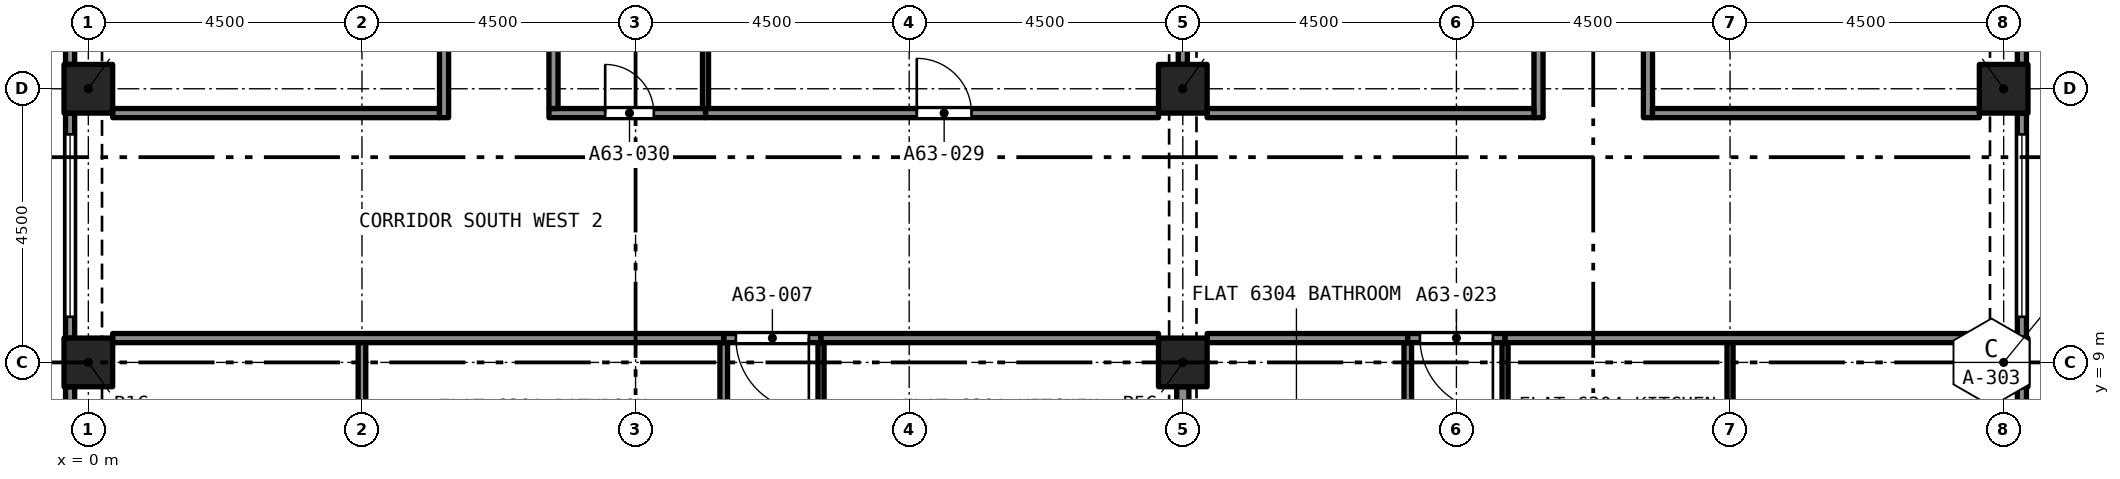
"""IFC4 building model, lengths in metres.
Left out: names, types, materials, properties, quantities, classifications, styles, units other than length and angle.
Written with IfcOpenShell. Run it as: python <this file> out.ifc"""

import sys

from ifc_helpers import new_model, si_unit, direction, frame, frame_2d, origin, origin_2d, place, context, subcontext, project, spatial, rectangle, extrude, element, fill, save


model = new_model("IFC4")
c1 = context("Model", 3, precision=1e-05, world=origin(), true_north=direction((0.0, 1.0)))
c2 = subcontext(c1, "Body", "Model", "MODEL_VIEW")
j1 = project(units=[si_unit("LENGTHUNIT", "METRE"), si_unit("PLANEANGLEUNIT", "RADIAN")], contexts=[c1])
p1 = place(None, origin())
s1 = spatial("IfcSite", under=j1, at=p1, CompositionType="ELEMENT")
p2 = place(p1, origin())
s2 = spatial("IfcBuilding", under=s1, at=p2, CompositionType="ELEMENT")
p3 = place(p2, frame((0.0, 0.0, 226.095)))
s3 = spatial("IfcBuildingStorey", under=s2, at=p3, CompositionType="ELEMENT", Elevation=226.095)
for number, where, z_axis, x_axis in (
    (1, (0.0, 9.0, 0.0), (0.0, 0.0, 1.0), (1.0, 0.0, 0.0)),
    (2, (18.0, 9.0, 0.0), (0.0, 0.0, 1.0), (1.0, 0.0, 0.0)),
    (3, (31.5, 9.0, 0.0), (0.0, 0.0, 1.0), (1.0, 0.0, 0.0)),
    (4, (0.0, 13.5, 0.0), (0.0, 0.0, 1.0), (1.0, 0.0, 0.0)),
    (5, (18.0, 13.5, 0.0), (0.0, 0.0, 1.0), (1.0, 0.0, 0.0)),
    (6, (31.5, 13.5, 0.0), (0.0, 0.0, 1.0), (1.0, 0.0, 0.0)),
):
    element("IfcColumn", number, at=place(p3, frame(where, z_axis=z_axis, x_axis=x_axis)), inside=s3, PredefinedType="COLUMN", context=c2, shape_type="SweptSolid", body=[
        extrude(rectangle(XDim=0.8, YDim=0.8, at=origin_2d()), origin(), (0.0, 0.0, 1.0), 3.2),
    ])
p4 = place(p3, frame((31.8, 8.6, 0.0), z_axis=(0.0, 0.0, 1.0), x_axis=(0.0, -1.0, 0.0)))
e7 = element("IfcWall", 7, at=p4, inside=s3, PredefinedType="SOLIDWALL", context=c2, shape_type="SweptSolid", body=[
    extrude(rectangle(XDim=3.7, YDim=0.15, at=frame_2d((1.85, 0.0))), origin(), (0.0, 0.0, 1.0), 3.2),
])
p5 = place(p4, frame((0.35, 0.0, 0.45)))
e8 = element("IfcOpeningElement", 8, at=p5, cuts=e7, PredefinedType="OPENING", context=c2, shape_type="SweptSolid", body=[
    extrude(rectangle(XDim=3.0, YDim=1.95, at=frame_2d((1.5, 0.975))), frame((0.0, 0.085, 0.0), z_axis=(0.0, -1.0, 0.0), x_axis=(1.0, 0.0, 0.0)), (0.0, 0.0, 1.0), 0.17),
])
p6 = place(p3, frame((31.8, 13.1, 0.0), z_axis=(0.0, 0.0, 1.0), x_axis=(0.0, -1.0, 0.0)))
e9 = element("IfcWall", 9, at=p6, inside=s3, PredefinedType="SOLIDWALL", context=c2, shape_type="SweptSolid", body=[
    extrude(rectangle(XDim=3.7, YDim=0.15, at=frame_2d((1.85, 0.0))), origin(), (0.0, 0.0, 1.0), 3.2),
])
p7 = place(p6, frame((0.35, 0.0, 0.45)))
e10 = element("IfcOpeningElement", 10, at=p7, cuts=e9, PredefinedType="OPENING", context=c2, shape_type="SweptSolid", body=[
    extrude(rectangle(XDim=3.0, YDim=1.95, at=frame_2d((1.5, 0.975))), frame((0.0, 0.085, 0.0), z_axis=(0.0, -1.0, 0.0), x_axis=(1.0, 0.0, 0.0)), (0.0, 0.0, 1.0), 0.17),
])
p8 = place(p3, frame((31.8, 17.6, 0.0), z_axis=(0.0, 0.0, 1.0), x_axis=(0.0, -1.0, 0.0)))
e11 = element("IfcWall", 11, at=p8, inside=s3, PredefinedType="SOLIDWALL", context=c2, shape_type="SweptSolid", body=[
    extrude(rectangle(XDim=3.7, YDim=0.15, at=frame_2d((1.85, 0.0))), origin(), (0.0, 0.0, 1.0), 3.2),
])
p9 = place(p8, frame((0.35, 0.0, 0.45)))
e12 = element("IfcOpeningElement", 12, at=p9, cuts=e11, PredefinedType="OPENING", context=c2, shape_type="SweptSolid", body=[
    extrude(rectangle(XDim=3.0, YDim=1.95, at=frame_2d((1.5, 0.975))), frame((0.0, 0.085, 0.0), z_axis=(0.0, -1.0, 0.0), x_axis=(1.0, 0.0, 0.0)), (0.0, 0.0, 1.0), 0.17),
])
p10 = place(p3, frame((-0.3, 13.9, 0.0), z_axis=(0.0, 0.0, 1.0), x_axis=(0.0, 1.0, 0.0)))
e13 = element("IfcWall", 13, at=p10, inside=s3, PredefinedType="SOLIDWALL", context=c2, shape_type="SweptSolid", body=[
    extrude(rectangle(XDim=3.7, YDim=0.15, at=frame_2d((1.85, 0.0))), origin(), (0.0, 0.0, 1.0), 3.2),
])
p11 = place(p10, frame((0.35, 0.0, 0.45)))
e14 = element("IfcOpeningElement", 14, at=p11, cuts=e13, PredefinedType="OPENING", context=c2, shape_type="SweptSolid", body=[
    extrude(rectangle(XDim=3.0, YDim=1.95, at=frame_2d((1.5, 0.975))), frame((0.0, 0.085, 0.0), z_axis=(0.0, -1.0, 0.0), x_axis=(1.0, 0.0, 0.0)), (0.0, 0.0, 1.0), 0.17),
])
p12 = place(p3, frame((-0.3, 9.4, 0.0), z_axis=(0.0, 0.0, 1.0), x_axis=(0.0, 1.0, 0.0)))
e15 = element("IfcWall", 15, at=p12, inside=s3, PredefinedType="SOLIDWALL", context=c2, shape_type="SweptSolid", body=[
    extrude(rectangle(XDim=3.7, YDim=0.15, at=frame_2d((1.85, 0.0))), origin(), (0.0, 0.0, 1.0), 3.2),
])
p13 = place(p12, frame((0.35, 0.0, 0.45)))
e16 = element("IfcOpeningElement", 16, at=p13, cuts=e15, PredefinedType="OPENING", context=c2, shape_type="SweptSolid", body=[
    extrude(rectangle(XDim=3.0, YDim=1.95, at=frame_2d((1.5, 0.975))), frame((0.0, 0.085, 0.0), z_axis=(0.0, -1.0, 0.0), x_axis=(1.0, 0.0, 0.0)), (0.0, 0.0, 1.0), 0.17),
])
p14 = place(p3, frame((-0.3, 4.9, 0.0), z_axis=(0.0, 0.0, 1.0), x_axis=(0.0, 1.0, 0.0)))
e17 = element("IfcWall", 17, at=p14, inside=s3, PredefinedType="SOLIDWALL", context=c2, shape_type="SweptSolid", body=[
    extrude(rectangle(XDim=3.7, YDim=0.15, at=frame_2d((1.85, 0.0))), origin(), (0.0, 0.0, 1.0), 3.2),
])
p15 = place(p14, frame((0.35, 0.0, 0.45)))
e18 = element("IfcOpeningElement", 18, at=p15, cuts=e17, PredefinedType="OPENING", context=c2, shape_type="SweptSolid", body=[
    extrude(rectangle(XDim=3.0, YDim=1.95, at=frame_2d((1.5, 0.975))), frame((0.0, 0.085, 0.0), z_axis=(0.0, -1.0, 0.0), x_axis=(1.0, 0.0, 0.0)), (0.0, 0.0, 1.0), 0.17),
])
p16 = place(p3, frame((10.45, 7.173, 0.0), z_axis=(0.0, 0.0, 1.0), x_axis=(0.0, 1.0, 0.0)))
e19 = element("IfcWall", 19, at=p16, inside=s3, PredefinedType="PARTITIONING", context=c2, shape_type="SweptSolid", body=[
    extrude(rectangle(XDim=2.152, YDim=0.125, at=frame_2d((1.076, 0.0))), origin(), (0.0, 0.0, 1.0), 2.9),
])
p17 = place(p3, frame((4.5, 7.11, 0.0), z_axis=(0.0, 0.0, 1.0), x_axis=(0.0, 1.0, 0.0)))
e20 = element("IfcWall", 20, at=p17, inside=s3, PredefinedType="PARTITIONING", context=c2, shape_type="SweptSolid", body=[
    extrude(rectangle(XDim=2.215, YDim=0.125, at=frame_2d((1.107, 0.0))), origin(), (0.0, 0.0, 1.0), 2.9),
])
p18 = place(p3, frame((12.05, 7.16, 0.0), z_axis=(0.0, 0.0, 1.0), x_axis=(0.0, 1.0, 0.0)))
e21 = element("IfcWall", 21, at=p18, inside=s3, PredefinedType="PARTITIONING", context=c2, shape_type="SweptSolid", body=[
    extrude(rectangle(XDim=2.165, YDim=0.1, at=frame_2d((1.083, 0.0))), origin(), (0.0, 0.0, 1.0), 2.9),
])
p19 = place(p3, frame((12.05, 9.4, 0.0), z_axis=(0.0, 0.0, 1.0), x_axis=(-1.0, 0.0, 0.0)))
e22 = element("IfcWall", 22, at=p19, inside=s3, PredefinedType="PARTITIONING", context=c2, shape_type="SweptSolid", body=[
    extrude(rectangle(XDim=1.6, YDim=0.15, at=frame_2d((0.8, 0.0))), origin(), (0.0, 0.0, 1.0), 2.9),
])
p20 = place(p19, frame((0.2, 0.0, 0.0)))
e23 = element("IfcOpeningElement", 23, at=p20, cuts=e22, PredefinedType="OPENING", context=c2, shape_type="SweptSolid", body=[
    extrude(rectangle(XDim=1.2, YDim=2.4, at=frame_2d((0.6, 1.2))), frame((0.0, 0.085, 0.0), z_axis=(0.0, -1.0, 0.0), x_axis=(1.0, 0.0, 0.0)), (0.0, 0.0, 1.0), 0.17),
])
p21 = place(p3, frame((18.0, 7.127, 0.0), z_axis=(0.0, 0.0, 1.0), x_axis=(0.0, 1.0, 0.0)))
e24 = element("IfcWall", 24, at=p21, inside=s3, PredefinedType="PARTITIONING", context=c2, shape_type="SweptSolid", body=[
    extrude(rectangle(XDim=1.473, YDim=0.2, at=frame_2d((0.736, 0.0))), origin(), (0.0, 0.0, 1.0), 2.38),
])
p22 = place(p3, frame((12.05, 9.4, 0.0), z_axis=(0.0, 0.0, 1.0), x_axis=(1.0, 0.0, 0.0)))
e25 = element("IfcWall", 25, at=p22, inside=s3, PredefinedType="PARTITIONING", context=c2, shape_type="SweptSolid", body=[
    extrude(rectangle(XDim=5.55, YDim=0.15, at=frame_2d((2.775, 0.0))), origin(), (0.0, 0.0, 1.0), 2.9),
])
p23 = place(p3, frame((0.4, 9.4, 0.0), z_axis=(0.0, 0.0, 1.0), x_axis=(1.0, 0.0, 0.0)))
e26 = element("IfcWall", 26, at=p23, inside=s3, PredefinedType="PARTITIONING", context=c2, shape_type="SweptSolid", body=[
    extrude(rectangle(XDim=10.05, YDim=0.15, at=frame_2d((5.025, 0.0))), origin(), (0.0, 0.0, 1.0), 2.9),
])
p24 = place(p3, frame((21.7, 7.252, 0.0), z_axis=(0.0, 0.0, 1.0), x_axis=(0.0, 1.0, 0.0)))
e27 = element("IfcWall", 27, at=p24, inside=s3, PredefinedType="PARTITIONING", context=c2, shape_type="SweptSolid", body=[
    extrude(rectangle(XDim=2.073, YDim=0.125, at=frame_2d((1.036, 0.0))), origin(), (0.0, 0.0, 1.0), 2.75),
])
p25 = place(p3, frame((18.4, 9.4, 0.0), z_axis=(0.0, 0.0, 1.0), x_axis=(1.0, 0.0, 0.0)))
e28 = element("IfcWall", 28, at=p25, inside=s3, PredefinedType="PARTITIONING", context=c2, shape_type="SweptSolid", body=[
    extrude(rectangle(XDim=3.3, YDim=0.15, at=frame_2d((1.65, 0.0))), origin(), (0.0, 0.0, 1.0), 2.75),
])
p26 = place(p3, frame((23.3, 7.24, 0.0), z_axis=(0.0, 0.0, 1.0), x_axis=(0.0, 1.0, 0.0)))
e29 = element("IfcWall", 29, at=p26, inside=s3, PredefinedType="PARTITIONING", context=c2, shape_type="SweptSolid", body=[
    extrude(rectangle(XDim=2.085, YDim=0.1, at=frame_2d((1.042, 0.0))), origin(), (0.0, 0.0, 1.0), 2.75),
])
p27 = place(p3, frame((23.3, 9.4, 0.0), z_axis=(0.0, 0.0, 1.0), x_axis=(-1.0, 0.0, 0.0)))
e30 = element("IfcWall", 30, at=p27, inside=s3, PredefinedType="PARTITIONING", context=c2, shape_type="SweptSolid", body=[
    extrude(rectangle(XDim=1.6, YDim=0.15, at=frame_2d((0.8, 0.0))), origin(), (0.0, 0.0, 1.0), 2.75),
])
p28 = place(p27, frame((0.2, 0.0, 0.0)))
e31 = element("IfcOpeningElement", 31, at=p28, cuts=e30, PredefinedType="OPENING", context=c2, shape_type="SweptSolid", body=[
    extrude(rectangle(XDim=1.2, YDim=2.4, at=frame_2d((0.6, 1.2))), frame((0.0, 0.085, 0.0), z_axis=(0.0, -1.0, 0.0), x_axis=(1.0, 0.0, 0.0)), (0.0, 0.0, 1.0), 0.17),
])
p29 = place(p3, frame((27.0, 7.19, 0.0), z_axis=(0.0, 0.0, 1.0), x_axis=(0.0, 1.0, 0.0)))
e32 = element("IfcWall", 32, at=p29, inside=s3, PredefinedType="PARTITIONING", context=c2, shape_type="SweptSolid", body=[
    extrude(rectangle(XDim=2.135, YDim=0.1, at=frame_2d((1.067, 0.0))), origin(), (0.0, 0.0, 1.0), 2.75),
])
p30 = place(p3, frame((23.3, 9.4, 0.0), z_axis=(0.0, 0.0, 1.0), x_axis=(1.0, 0.0, 0.0)))
e33 = element("IfcWall", 33, at=p30, inside=s3, PredefinedType="PARTITIONING", context=c2, shape_type="SweptSolid", body=[
    extrude(rectangle(XDim=7.8, YDim=0.15, at=frame_2d((3.9, 0.0))), origin(), (0.0, 0.0, 1.0), 2.75),
])
p31 = place(p3, frame((23.85, 13.025, 0.0), z_axis=(0.0, 0.0, 1.0), x_axis=(0.0, 1.0, 0.0)))
e34 = element("IfcWall", 34, at=p31, inside=s3, PredefinedType="PARTITIONING", context=c2, shape_type="SweptSolid", body=[
    extrude(rectangle(XDim=9.55, YDim=0.15, at=frame_2d((4.775, 0.0))), origin(), (0.0, 0.0, 1.0), 2.75),
])
p32 = place(p31, frame((4.275, 0.0, 0.0)))
e35 = element("IfcOpeningElement", 35, at=p32, cuts=e34, PredefinedType="OPENING", context=c2, shape_type="SweptSolid", body=[
    extrude(rectangle(XDim=1.0, YDim=2.1, at=frame_2d((0.5, 1.05))), frame((0.0, 0.085, 0.0), z_axis=(0.0, -1.0, 0.0), x_axis=(1.0, 0.0, 0.0)), (0.0, 0.0, 1.0), 0.17),
])
p33 = place(p3, frame((25.65, 22.575, 0.0), z_axis=(0.0, 0.0, 1.0), x_axis=(0.0, -1.0, 0.0)))
e36 = element("IfcWall", 36, at=p33, inside=s3, PredefinedType="PARTITIONING", context=c2, shape_type="SweptSolid", body=[
    extrude(rectangle(XDim=9.55, YDim=0.15, at=frame_2d((4.775, 0.0))), origin(), (0.0, 0.0, 1.0), 2.75),
])
p34 = place(p33, frame((4.275, 0.0, 0.0)))
e37 = element("IfcOpeningElement", 37, at=p34, cuts=e36, PredefinedType="OPENING", context=c2, shape_type="SweptSolid", body=[
    extrude(rectangle(XDim=1.0, YDim=2.1, at=frame_2d((0.5, 1.05))), frame((0.0, 0.085, 0.0), z_axis=(0.0, -1.0, 0.0), x_axis=(1.0, 0.0, 0.0)), (0.0, 0.0, 1.0), 0.17),
])
for number, where, z_axis, x_axis in (
    (38, (18.4, 13.1, 0.0), (0.0, 0.0, 1.0), (1.0, 0.0, 0.0)),
    (39, (25.725, 13.1, 0.0), (0.0, 0.0, 1.0), (1.0, 0.0, 0.0)),
):
    element("IfcWall", number, at=place(p3, frame(where, z_axis=z_axis, x_axis=x_axis)), inside=s3, PredefinedType="PARTITIONING", context=c2, shape_type="SweptSolid", body=[
        extrude(rectangle(XDim=5.375, YDim=0.15, at=frame_2d((2.688, 0.0))), origin(), (0.0, 0.0, 1.0), 2.75),
    ])
p35 = place(p3, frame((10.15, 13.1, 0.0), z_axis=(0.0, 0.0, 1.0), x_axis=(1.0, 0.0, 0.0)))
e40 = element("IfcWall", 40, at=p35, inside=s3, PredefinedType="PARTITIONING", context=c2, shape_type="SweptSolid", body=[
    extrude(rectangle(XDim=7.45, YDim=0.15, at=frame_2d((3.725, 0.0))), origin(), (0.0, 0.0, 1.0), 2.9),
])
p36 = place(p35, frame((3.475, 0.0, 0.0)))
e41 = element("IfcOpeningElement", 41, at=p36, cuts=e40, PredefinedType="OPENING", context=c2, shape_type="SweptSolid", body=[
    extrude(rectangle(XDim=0.9, YDim=2.1, at=frame_2d((0.45, 1.05))), frame((0.0, 0.085, 0.0), z_axis=(0.0, -1.0, 0.0), x_axis=(1.0, 0.0, 0.0)), (0.0, 0.0, 1.0), 0.17),
])
p37 = place(p3, frame((7.575, 13.1, 0.0), z_axis=(0.0, 0.0, 1.0), x_axis=(1.0, 0.0, 0.0)))
e42 = element("IfcWall", 42, at=p37, inside=s3, PredefinedType="PARTITIONING", context=c2, shape_type="SweptSolid", body=[
    extrude(rectangle(XDim=2.575, YDim=0.15, at=frame_2d((1.288, 0.0))), origin(), (0.0, 0.0, 1.0), 2.9),
])
p38 = place(p37, frame((0.925, 0.0, 0.0)))
e43 = element("IfcOpeningElement", 43, at=p38, cuts=e42, PredefinedType="OPENING", context=c2, shape_type="SweptSolid", body=[
    extrude(rectangle(XDim=0.8, YDim=2.1, at=frame_2d((0.4, 1.05))), frame((0.0, 0.085, 0.0), z_axis=(0.0, -1.0, 0.0), x_axis=(1.0, 0.0, 0.0)), (0.0, 0.0, 1.0), 0.17),
])
p39 = place(p3, frame((0.4, 13.1, 0.0), z_axis=(0.0, 0.0, 1.0), x_axis=(1.0, 0.0, 0.0)))
e44 = element("IfcWall", 44, at=p39, inside=s3, PredefinedType="PARTITIONING", context=c2, shape_type="SweptSolid", body=[
    extrude(rectangle(XDim=5.375, YDim=0.15, at=frame_2d((2.688, 0.0))), origin(), (0.0, 0.0, 1.0), 2.9),
])
p40 = place(p3, frame((18.0, 13.9, 0.0), z_axis=(0.0, 0.0, 1.0), x_axis=(0.0, 1.0, 0.0)))
e45 = element("IfcWall", 45, at=p40, inside=s3, PredefinedType="PARTITIONING", context=c2, shape_type="SweptSolid", body=[
    extrude(rectangle(XDim=3.4, YDim=0.15, at=frame_2d((1.7, 0.0))), origin(), (0.0, 0.0, 1.0), 2.38),
])
p41 = place(p3, frame((7.65, 13.175, 0.0), z_axis=(0.0, 0.0, 1.0), x_axis=(0.0, 1.0, 0.0)))
e46 = element("IfcWall", 46, at=p41, inside=s3, PredefinedType="PARTITIONING", context=c2, shape_type="SweptSolid", body=[
    extrude(rectangle(XDim=4.125, YDim=0.15, at=frame_2d((2.062, 0.0))), origin(), (0.0, 0.0, 1.0), 2.9),
])
p42 = place(p3, frame((5.85, 13.025, 0.0), z_axis=(0.0, 0.0, 1.0), x_axis=(0.0, 1.0, 0.0)))
e47 = element("IfcWall", 47, at=p42, inside=s3, PredefinedType="PARTITIONING", context=c2, shape_type="SweptSolid", body=[
    extrude(rectangle(XDim=9.475, YDim=0.15, at=frame_2d((4.738, 0.0))), origin(), (0.0, 0.0, 1.0), 2.9),
])
p43 = place(p42, frame((4.275, 0.0, 0.0)))
e48 = element("IfcOpeningElement", 48, at=p43, cuts=e47, PredefinedType="OPENING", context=c2, shape_type="SweptSolid", body=[
    extrude(rectangle(XDim=1.0, YDim=2.1, at=frame_2d((0.5, 1.05))), frame((0.0, 0.085, 0.0), z_axis=(0.0, -1.0, 0.0), x_axis=(1.0, 0.0, 0.0)), (0.0, 0.0, 1.0), 0.17),
])
p44 = place(p3, frame((10.15, 13.175, 0.0), z_axis=(0.0, 0.0, 1.0), x_axis=(0.0, 1.0, 0.0)))
e49 = element("IfcWall", 49, at=p44, inside=s3, PredefinedType="PARTITIONING", context=c2, shape_type="SweptSolid", body=[
    extrude(rectangle(XDim=4.05, YDim=0.1, at=frame_2d((2.025, 0.0))), origin(), (0.0, 0.0, 1.0), 2.9),
])
p45 = place(p7, origin())
e50 = element("IfcWindow", 50, at=p45, inside=s3, PartitioningType="SINGLE_PANEL", PredefinedType="WINDOW", context=c2, shape_type="SweptSolid", body=[
    extrude(rectangle(XDim=3.0, YDim=1.95, at=frame_2d((1.5, 0.975))), frame((0.0, 0.03, 0.0), z_axis=(0.0, -1.0, 0.0), x_axis=(1.0, 0.0, 0.0)), (0.0, 0.0, 1.0), 0.06),
])
fill(e10, e50)
p46 = place(p13, origin())
e51 = element("IfcWindow", 51, at=p46, inside=s3, PartitioningType="SINGLE_PANEL", PredefinedType="WINDOW", context=c2, shape_type="SweptSolid", body=[
    extrude(rectangle(XDim=3.0, YDim=1.95, at=frame_2d((1.5, 0.975))), frame((0.0, 0.03, 0.0), z_axis=(0.0, -1.0, 0.0), x_axis=(1.0, 0.0, 0.0)), (0.0, 0.0, 1.0), 0.06),
])
fill(e16, e51)
p47 = place(p20, origin())
e52 = element("IfcDoor", 52, at=p47, inside=s3, OperationType="SINGLE_SWING_LEFT", PredefinedType="DOOR", context=c2, shape_type="SweptSolid", body=[
    extrude(rectangle(XDim=1.2, YDim=2.4, at=frame_2d((0.6, 1.2))), frame((0.0, 0.025, 0.0), z_axis=(0.0, -1.0, 0.0), x_axis=(1.0, 0.0, 0.0)), (0.0, 0.0, 1.0), 0.05),
])
fill(e23, e52)
p48 = place(p28, origin())
e53 = element("IfcDoor", 53, at=p48, inside=s3, OperationType="SINGLE_SWING_LEFT", PredefinedType="DOOR", context=c2, shape_type="SweptSolid", body=[
    extrude(rectangle(XDim=1.2, YDim=2.4, at=frame_2d((0.6, 1.2))), frame((0.0, 0.025, 0.0), z_axis=(0.0, -1.0, 0.0), x_axis=(1.0, 0.0, 0.0)), (0.0, 0.0, 1.0), 0.05),
])
fill(e31, e53)
p49 = place(p36, origin())
e54 = element("IfcDoor", 54, at=p49, inside=s3, OperationType="SINGLE_SWING_RIGHT", PredefinedType="DOOR", context=c2, shape_type="SweptSolid", body=[
    extrude(rectangle(XDim=0.9, YDim=2.1, at=frame_2d((0.45, 1.05))), frame((0.0, 0.025, 0.0), z_axis=(0.0, -1.0, 0.0), x_axis=(1.0, 0.0, 0.0)), (0.0, 0.0, 1.0), 0.05),
])
fill(e41, e54)
p50 = place(p38, origin())
e55 = element("IfcDoor", 55, at=p50, inside=s3, OperationType="SINGLE_SWING_RIGHT", PredefinedType="DOOR", context=c2, shape_type="SweptSolid", body=[
    extrude(rectangle(XDim=0.8, YDim=2.1, at=frame_2d((0.4, 1.05))), frame((0.0, 0.025, 0.0), z_axis=(0.0, -1.0, 0.0), x_axis=(1.0, 0.0, 0.0)), (0.0, 0.0, 1.0), 0.05),
])
fill(e43, e55)
save(model, sys.argv[1])
